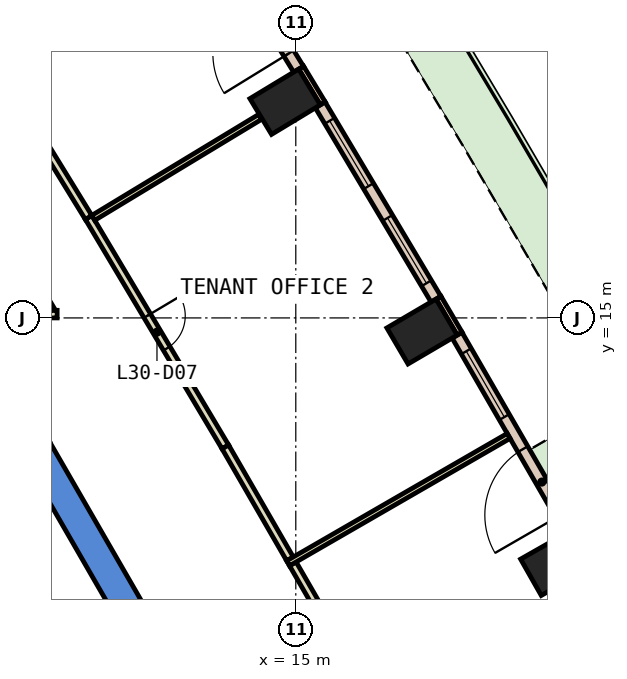
"""IFC4 building model, lengths in metres.
Left out: names, types, materials, properties, quantities, classifications, styles, units other than length and angle.
Written with IfcOpenShell. Run it as: python <this file> out.ifc"""

import sys

from ifc_helpers import new_model, si_unit, direction, frame, frame_2d, origin, origin_2d, place, context, subcontext, project, spatial, polyline, rectangle, outline, extrude, element, fill, save


model = new_model("IFC4")
c1 = context("Model", 3, precision=1e-05, world=origin(), true_north=direction((0.0, 1.0)))
c2 = subcontext(c1, "Body", "Model", "MODEL_VIEW")
j1 = project(units=[si_unit("LENGTHUNIT", "METRE"), si_unit("PLANEANGLEUNIT", "RADIAN")], contexts=[c1])
p1 = place(None, origin())
s1 = spatial("IfcSite", under=j1, at=p1, CompositionType="ELEMENT")
p2 = place(p1, origin())
s2 = spatial("IfcBuilding", under=s1, at=p2, CompositionType="ELEMENT")
p3 = place(p2, frame((0.0, 0.0, 138.2)))
s3 = spatial("IfcBuildingStorey", under=s2, at=p3, CompositionType="ELEMENT", Elevation=138.2)
for number, where, z_axis, x_axis in (
    (1, (21.84, 8.546, 0.0), (0.0, 0.0, 1.0), (-0.494, 0.869, 0.0)),
    (2, (18.322, 14.642, 0.0), (0.0, 0.0, 1.0), (-0.506, 0.863, 0.0)),
    (3, (14.719, 20.688, 0.0), (0.0, 0.0, 1.0), (-0.518, 0.855, 0.0)),
):
    element("IfcColumn", number, at=place(p3, frame(where, z_axis=z_axis, x_axis=x_axis)), inside=s3, PredefinedType="COLUMN", context=c2, shape_type="SweptSolid", body=[
        extrude(rectangle(XDim=1.1, YDim=1.5, at=origin_2d()), origin(), (0.0, 0.0, 1.0), 3.8),
    ])
p4 = place(p3, frame((0.0, 0.0, -0.6)))
e4 = element("IfcWall", 4, at=p4, inside=s3, PredefinedType="SHEAR", context=c2, shape_type="SweptSolid", body=[
    extrude(outline(polyline([(8.517, 11.748), (7.824, 11.348), (12.933, 2.5), (13.856, 2.5), (8.517, 11.748)])), origin(), (0.0, 0.0, 1.0), 4.4),
])
p5 = place(p3, frame((19.312, 14.585, 0.0), z_axis=(0.0, 0.0, 1.0), x_axis=(-0.50667077411, 0.862139621327, 0.0)))
e5 = element("IfcWall", 5, at=p5, inside=s3, PredefinedType="STANDARD", context=c2, shape_type="SweptSolid", body=[
    extrude(rectangle(XDim=1.1, YDim=0.15, at=frame_2d((0.55, 0.0))), origin(), (0.0, 0.0, 1.0), 3.8),
])
p6 = place(p3, frame((15.71, 20.645, 0.0), z_axis=(0.0, 0.0, 1.0), x_axis=(-0.518178754102, 0.855272341888, 0.0)))
e6 = element("IfcWall", 6, at=p6, inside=s3, PredefinedType="STANDARD", context=c2, shape_type="SweptSolid", body=[
    extrude(rectangle(XDim=1.1, YDim=0.15, at=frame_2d((0.55, 0.0))), origin(), (0.0, 0.0, 1.0), 3.8),
])
p7 = place(p3, frame((22.218, 9.392, 0.0), z_axis=(0.0, 0.0, 1.0), x_axis=(-0.49994263896, 0.866058518664, 0.0)))
e7 = element("IfcWall", 7, at=p7, inside=s3, PredefinedType="STANDARD", context=c2, shape_type="SweptSolid", body=[
    extrude(rectangle(XDim=5.951, YDim=0.3, at=frame_2d((2.976, 0.0))), origin(), (0.0, 0.0, 1.0), 3.8),
])
p8 = place(p7, frame((0.488, 0.0, 0.0)))
e8 = element("IfcOpeningElement", 8, at=p8, cuts=e7, PredefinedType="OPENING", context=c2, shape_type="SweptSolid", body=[
    extrude(rectangle(XDim=2.0, YDim=2.4, at=frame_2d((1.0, 1.2))), frame((0.0, 0.16, 0.0), z_axis=(0.0, -1.0, 0.0), x_axis=(1.0, 0.0, 0.0)), (0.0, 0.0, 1.0), 0.32),
])
p9 = place(p7, frame((3.463, 0.0, 0.9)))
e9 = element("IfcOpeningElement", 9, at=p9, cuts=e7, PredefinedType="OPENING", context=c2, shape_type="SweptSolid", body=[
    extrude(rectangle(XDim=2.0, YDim=2.6, at=frame_2d((1.0, 1.3))), frame((0.0, 0.16, 0.0), z_axis=(0.0, -1.0, 0.0), x_axis=(1.0, 0.0, 0.0)), (0.0, 0.0, 1.0), 0.32),
])
p10 = place(p3, frame((18.688, 15.493, 0.0), z_axis=(0.0, 0.0, 1.0), x_axis=(-0.511856715331, 0.859070836992, 0.0)))
e10 = element("IfcWall", 10, at=p10, inside=s3, PredefinedType="STANDARD", context=c2, shape_type="SweptSolid", body=[
    extrude(rectangle(XDim=5.951, YDim=0.3, at=frame_2d((2.975, 0.0))), origin(), (0.0, 0.0, 1.0), 3.8),
])
p11 = place(p10, frame((0.488, 0.0, 0.9)))
e11 = element("IfcOpeningElement", 11, at=p11, cuts=e10, PredefinedType="OPENING", context=c2, shape_type="SweptSolid", body=[
    extrude(rectangle(XDim=2.0, YDim=2.6, at=frame_2d((1.0, 1.3))), frame((0.0, 0.16, 0.0), z_axis=(0.0, -1.0, 0.0), x_axis=(1.0, 0.0, 0.0)), (0.0, 0.0, 1.0), 0.32),
])
p12 = place(p10, frame((3.463, 0.0, 0.9)))
e12 = element("IfcOpeningElement", 12, at=p12, cuts=e10, PredefinedType="OPENING", context=c2, shape_type="SweptSolid", body=[
    extrude(rectangle(XDim=2.0, YDim=2.6, at=frame_2d((1.0, 1.3))), frame((0.0, 0.16, 0.0), z_axis=(0.0, -1.0, 0.0), x_axis=(1.0, 0.0, 0.0)), (0.0, 0.0, 1.0), 0.32),
])
p13 = place(p3, frame((15.073, 21.544, 0.0), z_axis=(0.0, 0.0, 1.0), x_axis=(-0.523719731127, 0.851890628677, 0.0)))
e13 = element("IfcWall", 13, at=p13, inside=s3, PredefinedType="STANDARD", context=c2, shape_type="SweptSolid", body=[
    extrude(rectangle(XDim=5.952, YDim=0.3, at=frame_2d((2.976, 0.0))), origin(), (0.0, 0.0, 1.0), 3.8),
])
p14 = place(p13, frame((0.488, 0.0, 0.0)))
e14 = element("IfcOpeningElement", 14, at=p14, cuts=e13, PredefinedType="OPENING", context=c2, shape_type="SweptSolid", body=[
    extrude(rectangle(XDim=2.0, YDim=2.4, at=frame_2d((1.0, 1.2))), frame((0.0, 0.16, 0.0), z_axis=(0.0, -1.0, 0.0), x_axis=(1.0, 0.0, 0.0)), (0.0, 0.0, 1.0), 0.32),
])
p15 = place(p13, frame((3.464, 0.0, 0.9)))
e15 = element("IfcOpeningElement", 15, at=p15, cuts=e13, PredefinedType="OPENING", context=c2, shape_type="SweptSolid", body=[
    extrude(rectangle(XDim=2.0, YDim=2.6, at=frame_2d((1.0, 1.3))), frame((0.0, 0.16, 0.0), z_axis=(0.0, -1.0, 0.0), x_axis=(1.0, 0.0, 0.0)), (0.0, 0.0, 1.0), 0.32),
])
p16 = place(p3, frame((6.484, 15.1, 0.0), z_axis=(0.0, 0.0, 1.0), x_axis=(1.0, 0.0, 0.0)))
e16 = element("IfcWall", 16, at=p16, inside=s3, PredefinedType="PARTITIONING", context=c2, shape_type="SweptSolid", body=[
    extrude(rectangle(XDim=2.236, YDim=0.2, at=frame_2d((1.118, 0.0))), origin(), (0.0, 0.0, 1.0), 3.8),
])
p17 = place(p3, frame((8.569, 15.186, 0.0), z_axis=(0.0, 0.0, 1.0), x_axis=(-0.512230585803, 0.85884796499, 0.0)))
e17 = element("IfcWall", 17, at=p17, inside=s3, PredefinedType="PARTITIONING", context=c2, shape_type="SweptSolid", body=[
    extrude(rectangle(XDim=1.523, YDim=0.2, at=frame_2d((0.761, 0.0))), origin(), (0.0, 0.0, 1.0), 3.8),
])
p18 = place(p3, frame((14.922, 8.529, 0.0), z_axis=(0.0, 0.0, 1.0), x_axis=(0.500097109062, -0.865969330582, 0.0)))
e18 = element("IfcWall", 18, at=p18, inside=s3, PredefinedType="PARTITIONING", context=c2, shape_type="SweptSolid", body=[
    extrude(rectangle(XDim=3.403, YDim=0.2, at=frame_2d((1.702, 0.0))), origin(), (0.0, 0.0, 1.0), 3.8),
])
p19 = place(p3, frame((9.548, 17.645, 0.0), z_axis=(0.0, 0.0, 1.0), x_axis=(0.511822081848, -0.859091471575, 0.0)))
e19 = element("IfcWall", 19, at=p19, inside=s3, PredefinedType="PARTITIONING", context=c2, shape_type="SweptSolid", body=[
    extrude(rectangle(XDim=7.03, YDim=0.2, at=frame_2d((3.515, 0.0))), origin(), (0.0, 0.0, 1.0), 3.8),
])
p20 = place(p19, frame((3.015, 0.0, 0.0)))
e20 = element("IfcOpeningElement", 20, at=p20, cuts=e19, PredefinedType="OPENING", context=c2, shape_type="SweptSolid", body=[
    extrude(rectangle(XDim=1.0, YDim=2.1, at=frame_2d((0.5, 1.05))), frame((0.0, 0.11, 0.0), z_axis=(0.0, -1.0, 0.0), x_axis=(1.0, 0.0, 0.0)), (0.0, 0.0, 1.0), 0.22),
])
p21 = place(p3, frame((13.146, 11.606, 0.0), z_axis=(0.0, 0.0, 1.0), x_axis=(0.499881871653, -0.866093594476, 0.0)))
e21 = element("IfcWall", 21, at=p21, inside=s3, PredefinedType="PARTITIONING", context=c2, shape_type="SweptSolid", body=[
    extrude(rectangle(XDim=3.403, YDim=0.2, at=frame_2d((1.701, 0.0))), origin(), (0.0, 0.0, 1.0), 3.8),
])
p22 = place(p3, frame((5.904, 23.571, 0.0), z_axis=(0.0, 0.0, 1.0), x_axis=(0.523647026552, -0.851935321244, 0.0)))
e22 = element("IfcWall", 22, at=p22, inside=s3, PredefinedType="PARTITIONING", context=c2, shape_type="SweptSolid", body=[
    extrude(rectangle(XDim=6.957, YDim=0.2, at=frame_2d((3.479, 0.0))), origin(), (0.0, 0.0, 1.0), 3.8),
])
p23 = place(p22, frame((3.053, 0.0, 0.0)))
e23 = element("IfcOpeningElement", 23, at=p23, cuts=e22, PredefinedType="OPENING", context=c2, shape_type="SweptSolid", body=[
    extrude(rectangle(XDim=1.0, YDim=2.1, at=frame_2d((0.5, 1.05))), frame((0.0, 0.11, 0.0), z_axis=(0.0, -1.0, 0.0), x_axis=(1.0, 0.0, 0.0)), (0.0, 0.0, 1.0), 0.22),
])
p24 = place(p3, frame((14.798, 8.544, 0.0), z_axis=(0.0, 0.0, 1.0), x_axis=(0.866041788654, 0.4999716195, 0.0)))
e24 = element("IfcWall", 24, at=p24, inside=s3, PredefinedType="PARTITIONING", context=c2, shape_type="SweptSolid", body=[
    extrude(rectangle(XDim=6.701, YDim=0.15, at=frame_2d((3.35, 0.0))), origin(), (0.0, 0.0, 1.0), 3.8),
])
p25 = place(p3, frame((9.671, 17.633, 0.0), z_axis=(0.0, 0.0, 1.0), x_axis=(0.855551112805, 0.517718353332, 0.0)))
e25 = element("IfcWall", 25, at=p25, inside=s3, PredefinedType="PARTITIONING", context=c2, shape_type="SweptSolid", body=[
    extrude(rectangle(XDim=5.13, YDim=0.15, at=frame_2d((2.565, 0.0))), origin(), (0.0, 0.0, 1.0), 3.8),
])
p26 = place(p8, origin())
e26 = element("IfcDoor", 26, at=p26, inside=s3, OperationType="SLIDING_TO_LEFT", PredefinedType="DOOR", context=c2, shape_type="SweptSolid", body=[
    extrude(rectangle(XDim=2.0, YDim=2.4, at=frame_2d((1.0, 1.2))), frame((0.0, 0.025, 0.0), z_axis=(0.0, -1.0, 0.0), x_axis=(1.0, 0.0, 0.0)), (0.0, 0.0, 1.0), 0.05),
])
fill(e8, e26)
p27 = place(p9, origin())
e27 = element("IfcWindow", 27, at=p27, inside=s3, PartitioningType="SINGLE_PANEL", PredefinedType="WINDOW", context=c2, shape_type="SweptSolid", body=[
    extrude(rectangle(XDim=2.0, YDim=2.6, at=frame_2d((1.0, 1.3))), frame((0.0, 0.03, 0.0), z_axis=(0.0, -1.0, 0.0), x_axis=(1.0, 0.0, 0.0)), (0.0, 0.0, 1.0), 0.06),
])
fill(e9, e27)
p28 = place(p11, origin())
e28 = element("IfcWindow", 28, at=p28, inside=s3, PartitioningType="SINGLE_PANEL", PredefinedType="WINDOW", context=c2, shape_type="SweptSolid", body=[
    extrude(rectangle(XDim=2.0, YDim=2.6, at=frame_2d((1.0, 1.3))), frame((0.0, 0.03, 0.0), z_axis=(0.0, -1.0, 0.0), x_axis=(1.0, 0.0, 0.0)), (0.0, 0.0, 1.0), 0.06),
])
fill(e11, e28)
p29 = place(p12, origin())
e29 = element("IfcWindow", 29, at=p29, inside=s3, PartitioningType="SINGLE_PANEL", PredefinedType="WINDOW", context=c2, shape_type="SweptSolid", body=[
    extrude(rectangle(XDim=2.0, YDim=2.6, at=frame_2d((1.0, 1.3))), frame((0.0, 0.03, 0.0), z_axis=(0.0, -1.0, 0.0), x_axis=(1.0, 0.0, 0.0)), (0.0, 0.0, 1.0), 0.06),
])
fill(e12, e29)
p30 = place(p14, origin())
e30 = element("IfcDoor", 30, at=p30, inside=s3, OperationType="SLIDING_TO_LEFT", PredefinedType="DOOR", context=c2, shape_type="SweptSolid", body=[
    extrude(rectangle(XDim=2.0, YDim=2.4, at=frame_2d((1.0, 1.2))), frame((0.0, 0.025, 0.0), z_axis=(0.0, -1.0, 0.0), x_axis=(1.0, 0.0, 0.0)), (0.0, 0.0, 1.0), 0.05),
])
fill(e14, e30)
p31 = place(p20, origin())
e31 = element("IfcDoor", 31, at=p31, inside=s3, OperationType="SINGLE_SWING_RIGHT", PredefinedType="DOOR", context=c2, shape_type="SweptSolid", body=[
    extrude(rectangle(XDim=1.0, YDim=2.1, at=frame_2d((0.5, 1.05))), frame((0.0, 0.025, 0.0), z_axis=(0.0, -1.0, 0.0), x_axis=(1.0, 0.0, 0.0)), (0.0, 0.0, 1.0), 0.05),
])
fill(e20, e31)
save(model, sys.argv[1])
